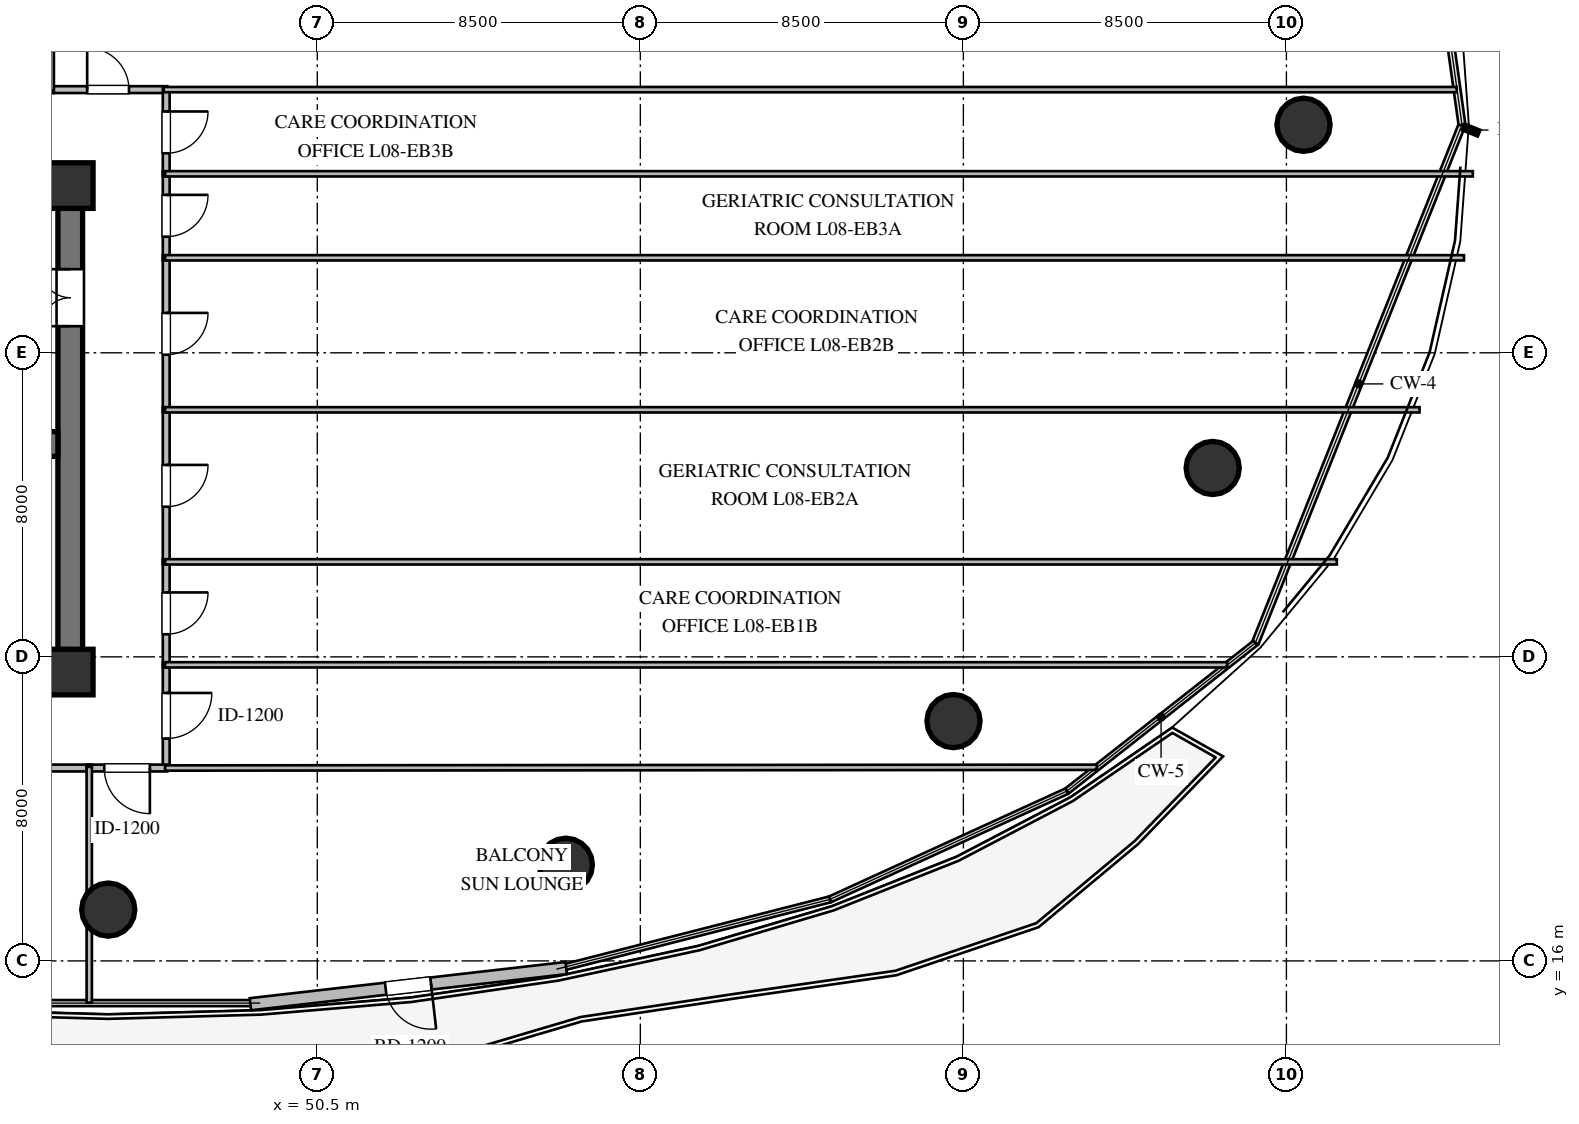
"""IFC4 building model, lengths in metres.
Left out: names, types, materials, properties, quantities, classifications, styles, units other than length and angle.
Written with IfcOpenShell. Run it as: python <this file> out.ifc"""

import sys

from ifc_helpers import new_model, si_unit, direction, frame, frame_2d, origin, origin_2d, place, context, subcontext, project, spatial, rectangle, circle, extrude, element, fill, save


model = new_model("IFC4")
c1 = context("Model", 3, precision=1e-05, world=origin(), true_north=direction((0.0, 1.0)))
c2 = subcontext(c1, "Body", "Model", "MODEL_VIEW")
j1 = project(units=[si_unit("LENGTHUNIT", "METRE"), si_unit("PLANEANGLEUNIT", "RADIAN")], contexts=[c1])
p1 = place(None, origin())
s1 = spatial("IfcSite", under=j1, at=p1, CompositionType="ELEMENT")
p2 = place(p1, origin())
s2 = spatial("IfcBuilding", under=s1, at=p2, CompositionType="ELEMENT")
p3 = place(p2, frame((0.0, 0.0, 34.8)))
s3 = spatial("IfcBuildingStorey", under=s2, at=p3, CompositionType="ELEMENT", Elevation=34.8)
for number, where, z_axis, x_axis in (
    (1, (21.675, 23.6, 0.0), (0.0, 0.0, 1.0), (1.0, 0.0, 0.0)),
    (2, (21.675, 36.4, 0.0), (0.0, 0.0, 1.0), (1.0, 0.0, 0.0)),
):
    element("IfcWall", number, at=place(p3, frame(where, z_axis=z_axis, x_axis=x_axis)), inside=s3, PredefinedType="SHEAR", context=c2, shape_type="SweptSolid", body=[
        extrude(rectangle(XDim=22.65, YDim=0.65, at=frame_2d((11.325, 0.0))), origin(), (0.0, 0.0, 1.0), 3.36),
    ])
p4 = place(p3, frame((44.0, 23.925, 0.0), z_axis=(0.0, 0.0, 1.0), x_axis=(0.0, 1.0, 0.0)))
e3 = element("IfcWall", 3, at=p4, inside=s3, PredefinedType="SHEAR", context=c2, shape_type="SweptSolid", body=[
    extrude(rectangle(XDim=12.15, YDim=0.65, at=frame_2d((6.075, 0.0))), origin(), (0.0, 0.0, 1.0), 3.36),
])
p5 = place(p4, frame((8.775, 0.0, 0.0)))
e4 = element("IfcOpeningElement", 4, at=p5, cuts=e3, PredefinedType="OPENING", context=c2, shape_type="SweptSolid", body=[
    extrude(rectangle(XDim=1.5, YDim=2.15, at=frame_2d((0.75, 1.075))), frame((0.0, 0.335, 0.0), z_axis=(0.0, -1.0, 0.0), x_axis=(1.0, 0.0, 0.0)), (0.0, 0.0, 1.0), 0.67),
])
p6 = place(p3, frame((22.325, 29.6, 0.0), z_axis=(0.0, 0.0, 1.0), x_axis=(1.0, 0.0, 0.0)))
e5 = element("IfcWall", 5, at=p6, inside=s3, PredefinedType="SHEAR", context=c2, shape_type="SweptSolid", body=[
    extrude(rectangle(XDim=21.35, YDim=0.65, at=frame_2d((10.675, 0.0))), origin(), (0.0, 0.0, 1.0), 3.36),
])
p7 = place(p6, frame((12.125, 0.0, 0.0)))
e6 = element("IfcOpeningElement", 6, at=p7, cuts=e5, PredefinedType="OPENING", context=c2, shape_type="SweptSolid", body=[
    extrude(rectangle(XDim=1.15, YDim=2.1, at=frame_2d((0.575, 1.05))), frame((0.0, 0.335, 0.0), z_axis=(0.0, -1.0, 0.0), x_axis=(1.0, 0.0, 0.0)), (0.0, 0.0, 1.0), 0.67),
])
for number, where, z_axis, x_axis in (
    (7, (44.0, 23.6, 0.0), (0.0, 0.0, 1.0), (1.0, 0.0, 0.0)),
    (8, (44.0, 36.4, 0.0), (0.0, 0.0, 1.0), (1.0, 0.0, 0.0)),
):
    element("IfcColumn", number, at=place(p3, frame(where, z_axis=z_axis, x_axis=x_axis)), inside=s3, PredefinedType="COLUMN", context=c2, shape_type="SweptSolid", body=[
        extrude(rectangle(XDim=1.2, YDim=1.2, at=origin_2d()), origin(), (0.0, 0.0, 1.0), 3.6),
    ])
for number, where, z_axis, x_axis in (
    (9, (76.45, 38.0, 0.0), (0.0, 0.0, 1.0), (1.0, 0.0, 0.0)),
    (10, (45.0, 17.35, 0.0), (0.0, 0.0, 1.0), (1.0, 0.0, 0.0)),
    (11, (57.04, 18.53, 0.0), (0.0, 0.0, 1.0), (1.0, 0.0, 0.0)),
    (12, (67.24, 22.31, 0.0), (0.0, 0.0, 1.0), (1.0, 0.0, 0.0)),
    (13, (74.06, 28.97, 0.0), (0.0, 0.0, 1.0), (1.0, 0.0, 0.0)),
):
    element("IfcColumn", number, at=place(p3, frame(where, z_axis=z_axis, x_axis=x_axis)), inside=s3, PredefinedType="COLUMN", context=c2, shape_type="SweptSolid", body=[
        extrude(circle(Radius=0.7, at=origin_2d()), origin(), (0.0, 0.0, 1.0), 3.6),
    ])
p8 = place(p3, frame((57.05, 15.812, 0.0), z_axis=(0.0, 0.0, 1.0), x_axis=(-0.993503192468, -0.113804246649, 0.0)))
e14 = element("IfcWall", 14, at=p8, inside=s3, PredefinedType="STANDARD", context=c2, shape_type="SweptSolid", body=[
    extrude(rectangle(XDim=8.365, YDim=0.32, at=frame_2d((4.182, 0.0))), origin(), (0.0, 0.0, 1.0), 3.36),
])
p9 = place(p8, frame((3.582, 0.0, 0.0)))
e15 = element("IfcOpeningElement", 15, at=p9, cuts=e14, PredefinedType="OPENING", context=c2, shape_type="SweptSolid", body=[
    extrude(rectangle(XDim=1.2, YDim=2.15, at=frame_2d((0.6, 1.075))), frame((0.0, 0.17, 0.0), z_axis=(0.0, -1.0, 0.0), x_axis=(1.0, 0.0, 0.0)), (0.0, 0.0, 1.0), 0.34),
])
p10 = place(p3, frame((39.435, 38.925, 0.0), z_axis=(0.0, 0.0, 1.0), x_axis=(1.0, 0.0, 0.0)))
e16 = element("IfcWall", 16, at=p10, inside=s3, PredefinedType="PARTITIONING", context=c2, shape_type="SweptSolid", body=[
    extrude(rectangle(XDim=4.13, YDim=0.18, at=frame_2d((2.065, 0.0))), origin(), (0.0, 0.0, 1.0), 3.36),
])
p11 = place(p10, frame((1.515, 0.0, 0.0)))
e17 = element("IfcOpeningElement", 17, at=p11, cuts=e16, PredefinedType="OPENING", context=c2, shape_type="SweptSolid", body=[
    extrude(rectangle(XDim=1.1, YDim=2.1, at=frame_2d((0.55, 1.05))), frame((0.0, 0.1, 0.0), z_axis=(0.0, -1.0, 0.0), x_axis=(1.0, 0.0, 0.0)), (0.0, 0.0, 1.0), 0.2),
])
p12 = place(p3, frame((43.435, 38.925, 0.0), z_axis=(0.0, 0.0, 1.0), x_axis=(1.0, 0.0, 0.0)))
e18 = element("IfcWall", 18, at=p12, inside=s3, PredefinedType="PARTITIONING", context=c2, shape_type="SweptSolid", body=[
    extrude(rectangle(XDim=3.12, YDim=0.18, at=frame_2d((1.56, 0.0))), origin(), (0.0, 0.0, 1.0), 3.36),
])
p13 = place(p12, frame((1.01, 0.0, 0.0)))
e19 = element("IfcOpeningElement", 19, at=p13, cuts=e18, PredefinedType="OPENING", context=c2, shape_type="SweptSolid", body=[
    extrude(rectangle(XDim=1.1, YDim=2.1, at=frame_2d((0.55, 1.05))), frame((0.0, 0.1, 0.0), z_axis=(0.0, -1.0, 0.0), x_axis=(1.0, 0.0, 0.0)), (0.0, 0.0, 1.0), 0.2),
])
p14 = place(p3, frame((46.525, 23.855, 0.0), z_axis=(0.0, 0.0, 1.0), x_axis=(0.0, -1.0, 0.0)))
e20 = element("IfcWall", 20, at=p14, inside=s3, PredefinedType="PARTITIONING", context=c2, shape_type="SweptSolid", body=[
    extrude(rectangle(XDim=2.81, YDim=0.18, at=frame_2d((1.405, 0.0))), origin(), (0.0, 0.0, 1.0), 3.36),
])
p15 = place(p14, frame((0.805, 0.0, 0.0)))
e21 = element("IfcOpeningElement", 21, at=p15, cuts=e20, PredefinedType="OPENING", context=c2, shape_type="SweptSolid", body=[
    extrude(rectangle(XDim=1.2, YDim=2.15, at=frame_2d((0.6, 1.075))), frame((0.0, 0.1, 0.0), z_axis=(0.0, -1.0, 0.0), x_axis=(1.0, 0.0, 0.0)), (0.0, 0.0, 1.0), 0.2),
])
p16 = place(p3, frame((46.525, 26.565, 0.0), z_axis=(0.0, 0.0, 1.0), x_axis=(0.0, -1.0, 0.0)))
e22 = element("IfcWall", 22, at=p16, inside=s3, PredefinedType="PARTITIONING", context=c2, shape_type="SweptSolid", body=[
    extrude(rectangle(XDim=2.84, YDim=0.18, at=frame_2d((1.42, 0.0))), origin(), (0.0, 0.0, 1.0), 3.36),
])
p17 = place(p16, frame((0.87, 0.0, 0.0)))
e23 = element("IfcOpeningElement", 23, at=p17, cuts=e22, PredefinedType="OPENING", context=c2, shape_type="SweptSolid", body=[
    extrude(rectangle(XDim=1.1, YDim=2.1, at=frame_2d((0.55, 1.05))), frame((0.0, 0.1, 0.0), z_axis=(0.0, -1.0, 0.0), x_axis=(1.0, 0.0, 0.0)), (0.0, 0.0, 1.0), 0.2),
])
p18 = place(p3, frame((46.525, 30.565, 0.0), z_axis=(0.0, 0.0, 1.0), x_axis=(0.0, -1.0, 0.0)))
e24 = element("IfcWall", 24, at=p18, inside=s3, PredefinedType="PARTITIONING", context=c2, shape_type="SweptSolid", body=[
    extrude(rectangle(XDim=4.13, YDim=0.18, at=frame_2d((2.065, 0.0))), origin(), (0.0, 0.0, 1.0), 3.36),
])
p19 = place(p18, frame((1.515, 0.0, 0.0)))
e25 = element("IfcOpeningElement", 25, at=p19, cuts=e24, PredefinedType="OPENING", context=c2, shape_type="SweptSolid", body=[
    extrude(rectangle(XDim=1.1, YDim=2.1, at=frame_2d((0.55, 1.05))), frame((0.0, 0.1, 0.0), z_axis=(0.0, -1.0, 0.0), x_axis=(1.0, 0.0, 0.0)), (0.0, 0.0, 1.0), 0.2),
])
p20 = place(p3, frame((46.525, 34.565, 0.0), z_axis=(0.0, 0.0, 1.0), x_axis=(0.0, -1.0, 0.0)))
e26 = element("IfcWall", 26, at=p20, inside=s3, PredefinedType="PARTITIONING", context=c2, shape_type="SweptSolid", body=[
    extrude(rectangle(XDim=4.13, YDim=0.18, at=frame_2d((2.065, 0.0))), origin(), (0.0, 0.0, 1.0), 3.36),
])
p21 = place(p20, frame((1.515, 0.0, 0.0)))
e27 = element("IfcOpeningElement", 27, at=p21, cuts=e26, PredefinedType="OPENING", context=c2, shape_type="SweptSolid", body=[
    extrude(rectangle(XDim=1.1, YDim=2.1, at=frame_2d((0.55, 1.05))), frame((0.0, 0.1, 0.0), z_axis=(0.0, -1.0, 0.0), x_axis=(1.0, 0.0, 0.0)), (0.0, 0.0, 1.0), 0.2),
])
p22 = place(p3, frame((46.525, 36.775, 0.0), z_axis=(0.0, 0.0, 1.0), x_axis=(0.0, -1.0, 0.0)))
e28 = element("IfcWall", 28, at=p22, inside=s3, PredefinedType="PARTITIONING", context=c2, shape_type="SweptSolid", body=[
    extrude(rectangle(XDim=2.34, YDim=0.18, at=frame_2d((1.17, 0.0))), origin(), (0.0, 0.0, 1.0), 3.36),
])
p23 = place(p22, frame((0.62, 0.0, 0.0)))
e29 = element("IfcOpeningElement", 29, at=p23, cuts=e28, PredefinedType="OPENING", context=c2, shape_type="SweptSolid", body=[
    extrude(rectangle(XDim=1.1, YDim=2.1, at=frame_2d((0.55, 1.05))), frame((0.0, 0.1, 0.0), z_axis=(0.0, -1.0, 0.0), x_axis=(1.0, 0.0, 0.0)), (0.0, 0.0, 1.0), 0.2),
])
p24 = place(p3, frame((46.525, 38.955, 0.0), z_axis=(0.0, 0.0, 1.0), x_axis=(0.0, -1.0, 0.0)))
e30 = element("IfcWall", 30, at=p24, inside=s3, PredefinedType="PARTITIONING", context=c2, shape_type="SweptSolid", body=[
    extrude(rectangle(XDim=2.31, YDim=0.18, at=frame_2d((1.155, 0.0))), origin(), (0.0, 0.0, 1.0), 3.36),
])
p25 = place(p24, frame((0.605, 0.0, 0.0)))
e31 = element("IfcOpeningElement", 31, at=p25, cuts=e30, PredefinedType="OPENING", context=c2, shape_type="SweptSolid", body=[
    extrude(rectangle(XDim=1.1, YDim=2.1, at=frame_2d((0.55, 1.05))), frame((0.0, 0.1, 0.0), z_axis=(0.0, -1.0, 0.0), x_axis=(1.0, 0.0, 0.0)), (0.0, 0.0, 1.0), 0.2),
])
p26 = place(p3, frame((44.565, 21.075, 0.0), z_axis=(0.0, 0.0, 1.0), x_axis=(-1.0, 0.0, 0.0)))
e32 = element("IfcWall", 32, at=p26, inside=s3, PredefinedType="PARTITIONING", context=c2, shape_type="SweptSolid", body=[
    extrude(rectangle(XDim=7.38, YDim=0.18, at=frame_2d((3.69, 0.0))), origin(), (0.0, 0.0, 1.0), 2.996),
])
p27 = place(p26, frame((3.14, 0.0, 0.0)))
e33 = element("IfcOpeningElement", 33, at=p27, cuts=e32, PredefinedType="OPENING", context=c2, shape_type="SweptSolid", body=[
    extrude(rectangle(XDim=1.1, YDim=2.1, at=frame_2d((0.55, 1.05))), frame((0.0, 0.1, 0.0), z_axis=(0.0, -1.0, 0.0), x_axis=(1.0, 0.0, 0.0)), (0.0, 0.0, 1.0), 0.2),
])
p28 = place(p3, frame((46.555, 21.075, 0.0), z_axis=(0.0, 0.0, 1.0), x_axis=(-1.0, 0.0, 0.0)))
e34 = element("IfcWall", 34, at=p28, inside=s3, PredefinedType="PARTITIONING", context=c2, shape_type="SweptSolid", body=[
    extrude(rectangle(XDim=2.12, YDim=0.18, at=frame_2d((1.06, 0.0))), origin(), (0.0, 0.0, 1.0), 3.36),
])
p29 = place(p28, frame((0.46, 0.0, 0.0)))
e35 = element("IfcOpeningElement", 35, at=p29, cuts=e34, PredefinedType="OPENING", context=c2, shape_type="SweptSolid", body=[
    extrude(rectangle(XDim=1.2, YDim=2.15, at=frame_2d((0.6, 1.075))), frame((0.0, 0.1, 0.0), z_axis=(0.0, -1.0, 0.0), x_axis=(1.0, 0.0, 0.0)), (0.0, 0.0, 1.0), 0.2),
])
p30 = place(p3, frame((43.5, 65.735, 0.0), z_axis=(0.0, 0.0, 1.0), x_axis=(0.0, -1.0, 0.0)))
e36 = element("IfcWall", 36, at=p30, inside=s3, PredefinedType="PARTITIONING", context=c2, shape_type="SweptSolid", body=[
    extrude(rectangle(XDim=26.84, YDim=0.14, at=frame_2d((13.42, 0.0))), origin(), (0.0, 0.0, 1.0), 2.806),
])
p31 = place(p3, frame((80.48, 38.925, 0.0), z_axis=(0.0, 0.0, 1.0), x_axis=(-1.0, 0.0, 0.0)))
e37 = element("IfcWall", 37, at=p31, inside=s3, PredefinedType="PARTITIONING", context=c2, shape_type="SweptSolid", body=[
    extrude(rectangle(XDim=34.02, YDim=0.14, at=frame_2d((17.01, 0.0))), origin(), (0.0, 0.0, 1.0), 3.36),
])
p32 = place(p3, frame((46.495, 23.79, 0.0), z_axis=(0.0, 0.0, 1.0), x_axis=(1.0, 0.0, 0.0)))
e38 = element("IfcWall", 38, at=p32, inside=s3, PredefinedType="PARTITIONING", context=c2, shape_type="SweptSolid", body=[
    extrude(rectangle(XDim=27.946, YDim=0.14, at=frame_2d((13.973, 0.0))), origin(), (0.0, 0.0, 1.0), 2.806),
])
p33 = place(p3, frame((71.011, 21.094, 0.0), z_axis=(0.0, 0.0, 1.0), x_axis=(-0.999999682646, -0.000796685534, 0.0)))
e39 = element("IfcWall", 39, at=p33, inside=s3, PredefinedType="PARTITIONING", context=c2, shape_type="SweptSolid", body=[
    extrude(rectangle(XDim=24.516, YDim=0.14, at=frame_2d((12.258, 0.0))), origin(), (0.0, 0.0, 1.0), 2.996),
])
p34 = place(p3, frame((46.495, 26.5, 0.0), z_axis=(0.0, 0.0, 1.0), x_axis=(1.0, 0.0, 0.0)))
e40 = element("IfcWall", 40, at=p34, inside=s3, PredefinedType="PARTITIONING", context=c2, shape_type="SweptSolid", body=[
    extrude(rectangle(XDim=30.831, YDim=0.14, at=frame_2d((15.416, 0.0))), origin(), (0.0, 0.0, 1.0), 2.806),
])
p35 = place(p3, frame((46.495, 30.5, 0.0), z_axis=(0.0, 0.0, 1.0), x_axis=(1.0, 0.0, 0.0)))
e41 = element("IfcWall", 41, at=p35, inside=s3, PredefinedType="PARTITIONING", context=c2, shape_type="SweptSolid", body=[
    extrude(rectangle(XDim=33.008, YDim=0.14, at=frame_2d((16.504, 0.0))), origin(), (0.0, 0.0, 1.0), 3.36),
])
p36 = place(p3, frame((46.495, 34.5, 0.0), z_axis=(0.0, 0.0, 1.0), x_axis=(1.0, 0.0, 0.0)))
e42 = element("IfcWall", 42, at=p36, inside=s3, PredefinedType="PARTITIONING", context=c2, shape_type="SweptSolid", body=[
    extrude(rectangle(XDim=34.177, YDim=0.14, at=frame_2d((17.088, 0.0))), origin(), (0.0, 0.0, 1.0), 3.36),
])
p37 = place(p3, frame((46.495, 36.71, 0.0), z_axis=(0.0, 0.0, 1.0), x_axis=(1.0, 0.0, 0.0)))
e43 = element("IfcWall", 43, at=p37, inside=s3, PredefinedType="PARTITIONING", context=c2, shape_type="SweptSolid", body=[
    extrude(rectangle(XDim=34.41, YDim=0.14, at=frame_2d((17.205, 0.0))), origin(), (0.0, 0.0, 1.0), 2.806),
])
p38 = place(p3, frame((44.5, 21.105, 0.0), z_axis=(0.0, 0.0, 1.0), x_axis=(0.0, -1.0, 0.0)))
e44 = element("IfcWall", 44, at=p38, inside=s3, PredefinedType="PARTITIONING", context=c2, shape_type="SweptSolid", body=[
    extrude(rectangle(XDim=6.205, YDim=0.14, at=frame_2d((3.103, 0.0))), origin(), (0.0, 0.0, 1.0), 2.806),
])
p39 = place(p9, origin())
e45 = element("IfcDoor", 45, at=p39, inside=s3, OperationType="SINGLE_SWING_LEFT", PredefinedType="DOOR", context=c2, shape_type="SweptSolid", body=[
    extrude(rectangle(XDim=1.2, YDim=2.15, at=frame_2d((0.6, 1.075))), frame((0.0, 0.025, 0.0), z_axis=(0.0, -1.0, 0.0), x_axis=(1.0, 0.0, 0.0)), (0.0, 0.0, 1.0), 0.05),
])
fill(e15, e45)
p40 = place(p5, origin())
e46 = element("IfcDoor", 46, at=p40, inside=s3, OperationType="DOUBLE_DOOR_SINGLE_SWING", PredefinedType="DOOR", context=c2, shape_type="SweptSolid", body=[
    extrude(rectangle(XDim=1.5, YDim=2.15, at=frame_2d((0.75, 1.075))), frame((0.0, 0.025, 0.0), z_axis=(0.0, -1.0, 0.0), x_axis=(1.0, 0.0, 0.0)), (0.0, 0.0, 1.0), 0.05),
])
fill(e4, e46)
p41 = place(p13, origin())
e47 = element("IfcDoor", 47, at=p41, inside=s3, OperationType="SINGLE_SWING_LEFT", PredefinedType="DOOR", context=c2, shape_type="SweptSolid", body=[
    extrude(rectangle(XDim=1.1, YDim=2.1, at=frame_2d((0.55, 1.05))), frame((0.0, 0.025, 0.0), z_axis=(0.0, -1.0, 0.0), x_axis=(1.0, 0.0, 0.0)), (0.0, 0.0, 1.0), 0.05),
])
fill(e19, e47)
p42 = place(p15, origin())
e48 = element("IfcDoor", 48, at=p42, inside=s3, OperationType="SINGLE_SWING_LEFT", PredefinedType="DOOR", context=c2, shape_type="SweptSolid", body=[
    extrude(rectangle(XDim=1.2, YDim=2.15, at=frame_2d((0.6, 1.075))), frame((0.0, 0.025, 0.0), z_axis=(0.0, -1.0, 0.0), x_axis=(1.0, 0.0, 0.0)), (0.0, 0.0, 1.0), 0.05),
])
fill(e21, e48)
p43 = place(p17, origin())
e49 = element("IfcDoor", 49, at=p43, inside=s3, OperationType="SINGLE_SWING_LEFT", PredefinedType="DOOR", context=c2, shape_type="SweptSolid", body=[
    extrude(rectangle(XDim=1.1, YDim=2.1, at=frame_2d((0.55, 1.05))), frame((0.0, 0.025, 0.0), z_axis=(0.0, -1.0, 0.0), x_axis=(1.0, 0.0, 0.0)), (0.0, 0.0, 1.0), 0.05),
])
fill(e23, e49)
p44 = place(p19, origin())
e50 = element("IfcDoor", 50, at=p44, inside=s3, OperationType="SINGLE_SWING_LEFT", PredefinedType="DOOR", context=c2, shape_type="SweptSolid", body=[
    extrude(rectangle(XDim=1.1, YDim=2.1, at=frame_2d((0.55, 1.05))), frame((0.0, 0.025, 0.0), z_axis=(0.0, -1.0, 0.0), x_axis=(1.0, 0.0, 0.0)), (0.0, 0.0, 1.0), 0.05),
])
fill(e25, e50)
p45 = place(p21, origin())
e51 = element("IfcDoor", 51, at=p45, inside=s3, OperationType="SINGLE_SWING_LEFT", PredefinedType="DOOR", context=c2, shape_type="SweptSolid", body=[
    extrude(rectangle(XDim=1.1, YDim=2.1, at=frame_2d((0.55, 1.05))), frame((0.0, 0.025, 0.0), z_axis=(0.0, -1.0, 0.0), x_axis=(1.0, 0.0, 0.0)), (0.0, 0.0, 1.0), 0.05),
])
fill(e27, e51)
p46 = place(p23, origin())
e52 = element("IfcDoor", 52, at=p46, inside=s3, OperationType="SINGLE_SWING_LEFT", PredefinedType="DOOR", context=c2, shape_type="SweptSolid", body=[
    extrude(rectangle(XDim=1.1, YDim=2.1, at=frame_2d((0.55, 1.05))), frame((0.0, 0.025, 0.0), z_axis=(0.0, -1.0, 0.0), x_axis=(1.0, 0.0, 0.0)), (0.0, 0.0, 1.0), 0.05),
])
fill(e29, e52)
p47 = place(p25, origin())
e53 = element("IfcDoor", 53, at=p47, inside=s3, OperationType="SINGLE_SWING_LEFT", PredefinedType="DOOR", context=c2, shape_type="SweptSolid", body=[
    extrude(rectangle(XDim=1.1, YDim=2.1, at=frame_2d((0.55, 1.05))), frame((0.0, 0.025, 0.0), z_axis=(0.0, -1.0, 0.0), x_axis=(1.0, 0.0, 0.0)), (0.0, 0.0, 1.0), 0.05),
])
fill(e31, e53)
p48 = place(p29, origin())
e54 = element("IfcDoor", 54, at=p48, inside=s3, OperationType="SINGLE_SWING_LEFT", PredefinedType="DOOR", context=c2, shape_type="SweptSolid", body=[
    extrude(rectangle(XDim=1.2, YDim=2.15, at=frame_2d((0.6, 1.075))), frame((0.0, 0.025, 0.0), z_axis=(0.0, -1.0, 0.0), x_axis=(1.0, 0.0, 0.0)), (0.0, 0.0, 1.0), 0.05),
])
fill(e35, e54)
save(model, sys.argv[1])
